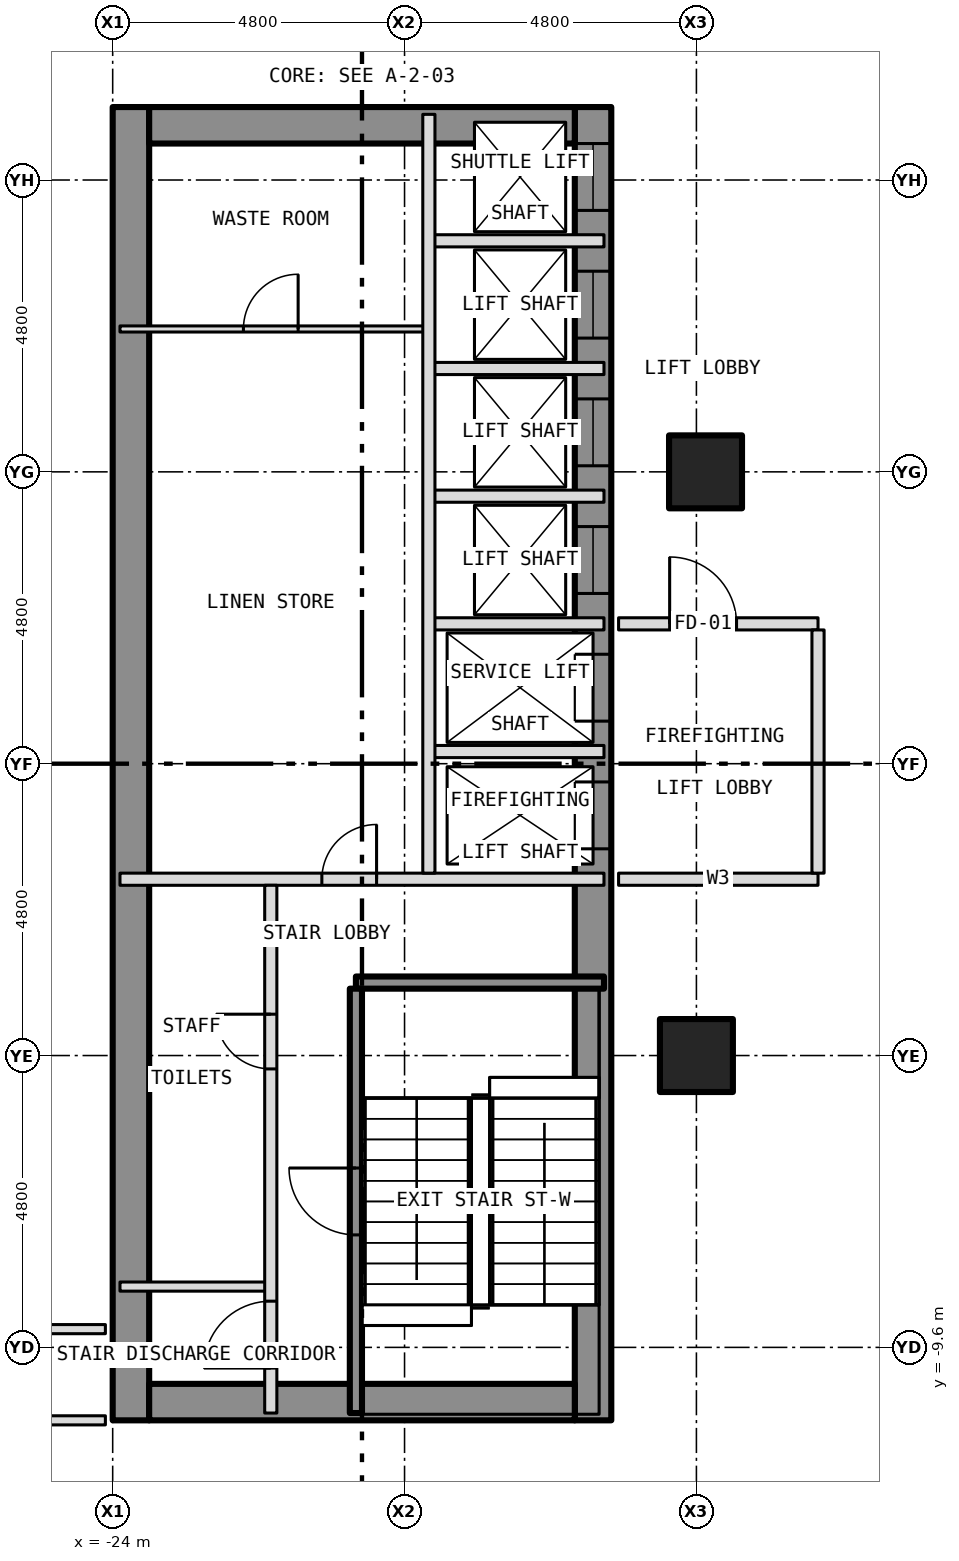
"""IFC4 building model, lengths in metres.
Left out: names, types, materials, properties, quantities, classifications, styles, units other than length and angle.
Written with IfcOpenShell. Run it as: python <this file> out.ifc"""

import sys

from ifc_helpers import new_model, si_unit, direction, frame, frame_2d, origin, origin_2d, place, context, subcontext, project, spatial, rectangle, hollow_rectangle, extrude, element, fill, save


model = new_model("IFC4")
c1 = context("Model", 3, precision=1e-05, world=origin(), true_north=direction((0.0, 1.0)))
c2 = subcontext(c1, "Body", "Model", "MODEL_VIEW")
j1 = project(units=[si_unit("LENGTHUNIT", "METRE"), si_unit("PLANEANGLEUNIT", "RADIAN")], contexts=[c1])
p1 = place(None, origin())
s1 = spatial("IfcSite", under=j1, at=p1, CompositionType="ELEMENT")
p2 = place(p1, origin())
s2 = spatial("IfcBuilding", under=s1, at=p2, CompositionType="ELEMENT")
p3 = place(p2, origin())
s3 = spatial("IfcBuildingStorey", under=s2, at=p3, CompositionType="ELEMENT", Elevation=0.0)
for number, where, z_axis, x_axis in (
    (1, (-14.4, -4.8, -0.3), (0.0, 0.0, 1.0), (1.0, 0.0, 0.0)),
    (2, (-14.25, 4.8, -0.3), (0.0, 0.0, 1.0), (1.0, 0.0, 0.0)),
):
    element("IfcColumn", number, at=place(p3, frame(where, z_axis=z_axis, x_axis=x_axis)), inside=s3, PredefinedType="COLUMN", context=c2, shape_type="SweptSolid", body=[
        extrude(hollow_rectangle(XDim=1.2, YDim=1.2, WallThickness=0.07, at=origin_2d()), origin(), (0.0, 0.0, 1.0), 7.55),
    ])
p4 = place(p3, frame((-16.1, -10.8, 0.0), z_axis=(0.0, 0.0, 1.0), x_axis=(0.0, 1.0, 0.0)))
e3 = element("IfcWall", 3, at=p4, inside=s3, PredefinedType="SHEAR", context=c2, shape_type="SweptSolid", body=[
    extrude(rectangle(XDim=21.6, YDim=0.6, at=frame_2d((10.8, 0.0))), origin(), (0.0, 0.0, 1.0), 7.2),
])
p5 = place(p4, frame((9.4, 0.0, 0.0)))
e4 = element("IfcOpeningElement", 4, at=p5, cuts=e3, PredefinedType="OPENING", context=c2, shape_type="SweptSolid", body=[
    extrude(rectangle(XDim=1.1, YDim=2.1, at=frame_2d((0.55, 1.05))), frame((0.0, 0.312, 0.0), z_axis=(0.0, -1.0, 0.0), x_axis=(1.0, 0.0, 0.0)), (0.0, 0.0, 1.0), 0.624),
])
p6 = place(p4, frame((11.5, 0.0, 0.0)))
e5 = element("IfcOpeningElement", 5, at=p6, cuts=e3, PredefinedType="OPENING", context=c2, shape_type="SweptSolid", body=[
    extrude(rectangle(XDim=1.1, YDim=2.1, at=frame_2d((0.55, 1.05))), frame((0.0, 0.312, 0.0), z_axis=(0.0, -1.0, 0.0), x_axis=(1.0, 0.0, 0.0)), (0.0, 0.0, 1.0), 0.624),
])
p7 = place(p4, frame((13.6, 0.0, 0.0)))
e6 = element("IfcOpeningElement", 6, at=p7, cuts=e3, PredefinedType="OPENING", context=c2, shape_type="SweptSolid", body=[
    extrude(rectangle(XDim=1.1, YDim=2.1, at=frame_2d((0.55, 1.05))), frame((0.0, 0.312, 0.0), z_axis=(0.0, -1.0, 0.0), x_axis=(1.0, 0.0, 0.0)), (0.0, 0.0, 1.0), 0.624),
])
p8 = place(p4, frame((15.7, 0.0, 0.0)))
e7 = element("IfcOpeningElement", 7, at=p8, cuts=e3, PredefinedType="OPENING", context=c2, shape_type="SweptSolid", body=[
    extrude(rectangle(XDim=1.1, YDim=2.1, at=frame_2d((0.55, 1.05))), frame((0.0, 0.312, 0.0), z_axis=(0.0, -1.0, 0.0), x_axis=(1.0, 0.0, 0.0)), (0.0, 0.0, 1.0), 0.624),
])
p9 = place(p4, frame((17.8, 0.0, 0.0)))
e8 = element("IfcOpeningElement", 8, at=p9, cuts=e3, PredefinedType="OPENING", context=c2, shape_type="SweptSolid", body=[
    extrude(rectangle(XDim=1.1, YDim=2.1, at=frame_2d((0.55, 1.05))), frame((0.0, 0.312, 0.0), z_axis=(0.0, -1.0, 0.0), x_axis=(1.0, 0.0, 0.0)), (0.0, 0.0, 1.0), 0.624),
])
p10 = place(p4, frame((19.9, 0.0, 0.0)))
e9 = element("IfcOpeningElement", 9, at=p10, cuts=e3, PredefinedType="OPENING", context=c2, shape_type="SweptSolid", body=[
    extrude(rectangle(XDim=1.1, YDim=2.1, at=frame_2d((0.55, 1.05))), frame((0.0, 0.312, 0.0), z_axis=(0.0, -1.0, 0.0), x_axis=(1.0, 0.0, 0.0)), (0.0, 0.0, 1.0), 0.624),
])
p11 = place(p3, frame((-23.7, -10.8, 0.0), z_axis=(0.0, 0.0, 1.0), x_axis=(0.0, 1.0, 0.0)))
e10 = element("IfcWall", 10, at=p11, inside=s3, PredefinedType="SHEAR", context=c2, shape_type="SweptSolid", body=[
    extrude(rectangle(XDim=21.6, YDim=0.6, at=frame_2d((10.8, 0.0))), origin(), (0.0, 0.0, 1.0), 7.2),
])
for number, where, z_axis, x_axis in (
    (11, (-23.4, 10.5, 0.0), (0.0, 0.0, 1.0), (1.0, 0.0, 0.0)),
    (12, (-23.4, -10.5, 0.0), (0.0, 0.0, 1.0), (1.0, 0.0, 0.0)),
):
    element("IfcWall", number, at=place(p3, frame(where, z_axis=z_axis, x_axis=x_axis)), inside=s3, PredefinedType="SHEAR", context=c2, shape_type="SweptSolid", body=[
        extrude(rectangle(XDim=7.0, YDim=0.6, at=frame_2d((3.5, 0.0))), origin(), (0.0, 0.0, 1.0), 7.2),
    ])
for number, where, z_axis, x_axis in (
    (13, (-36.9, -10.8, 0.0), (0.0, 0.0, 1.0), (1.0, 0.0, 0.0)),
    (14, (-36.9, -9.3, 0.0), (0.0, 0.0, 1.0), (1.0, 0.0, 0.0)),
):
    element("IfcWall", number, at=place(p3, frame(where, z_axis=z_axis, x_axis=x_axis)), inside=s3, PredefinedType="PARTITIONING", context=c2, shape_type="SweptSolid", body=[
        extrude(rectangle(XDim=12.78, YDim=0.15, at=frame_2d((6.39, 0.0))), origin(), (0.0, 0.0, 1.0), 7.25),
    ])
p12 = place(p3, frame((-23.88, -8.6, 0.0), z_axis=(0.0, 0.0, 1.0), x_axis=(1.0, 0.0, 0.0)))
e15 = element("IfcWall", 15, at=p12, inside=s3, PredefinedType="PARTITIONING", context=c2, shape_type="SweptSolid", body=[
    extrude(rectangle(XDim=2.48, YDim=0.15, at=frame_2d((1.24, 0.0))), origin(), (0.0, 0.0, 1.0), 7.2),
])
p13 = place(p3, frame((-20.0, -3.6, 0.0), z_axis=(0.0, 0.0, 1.0), x_axis=(1.0, 0.0, 0.0)))
e16 = element("IfcWall", 16, at=p13, inside=s3, PredefinedType="SHEAR", context=c2, shape_type="SweptSolid", body=[
    extrude(rectangle(XDim=4.08, YDim=0.2, at=frame_2d((2.04, 0.0))), origin(), (0.0, 0.0, 1.0), 7.2),
])
p14 = place(p3, frame((-23.88, -1.9, 0.0), z_axis=(0.0, 0.0, 1.0), x_axis=(1.0, 0.0, 0.0)))
e17 = element("IfcWall", 17, at=p14, inside=s3, PredefinedType="PARTITIONING", context=c2, shape_type="SweptSolid", body=[
    extrude(rectangle(XDim=7.96, YDim=0.2, at=frame_2d((3.98, 0.0))), origin(), (0.0, 0.0, 1.0), 7.2),
])
p15 = place(p14, frame((3.32, 0.0, 0.0)))
e18 = element("IfcOpeningElement", 18, at=p15, cuts=e17, PredefinedType="OPENING", context=c2, shape_type="SweptSolid", body=[
    extrude(rectangle(XDim=0.9, YDim=2.1, at=frame_2d((0.45, 1.05))), frame((0.0, 0.112, 0.0), z_axis=(0.0, -1.0, 0.0), x_axis=(1.0, 0.0, 0.0)), (0.0, 0.0, 1.0), 0.224),
])
p16 = place(p3, frame((-15.68, -1.9, 0.0), z_axis=(0.0, 0.0, 1.0), x_axis=(1.0, 0.0, 0.0)))
e19 = element("IfcWall", 19, at=p16, inside=s3, PredefinedType="PARTITIONING", context=c2, shape_type="SweptSolid", body=[
    extrude(rectangle(XDim=3.28, YDim=0.2, at=frame_2d((1.64, 0.0))), origin(), (0.0, 0.0, 1.0), 7.25),
])
for number, where, z_axis, x_axis in (
    (20, (-18.8, 0.2, 0.0), (0.0, 0.0, 1.0), (1.0, 0.0, 0.0)),
    (21, (-18.8, 2.3, 0.0), (0.0, 0.0, 1.0), (1.0, 0.0, 0.0)),
):
    element("IfcWall", number, at=place(p3, frame(where, z_axis=z_axis, x_axis=x_axis)), inside=s3, PredefinedType="PARTITIONING", context=c2, shape_type="SweptSolid", body=[
        extrude(rectangle(XDim=2.88, YDim=0.2, at=frame_2d((1.44, 0.0))), origin(), (0.0, 0.0, 1.0), 7.2),
    ])
p17 = place(p3, frame((-15.68, 2.3, 0.0), z_axis=(0.0, 0.0, 1.0), x_axis=(1.0, 0.0, 0.0)))
e22 = element("IfcWall", 22, at=p17, inside=s3, PredefinedType="PARTITIONING", context=c2, shape_type="SweptSolid", body=[
    extrude(rectangle(XDim=3.28, YDim=0.2, at=frame_2d((1.64, 0.0))), origin(), (0.0, 0.0, 1.0), 7.25),
])
p18 = place(p17, frame((0.84, 0.0, 0.0)))
e23 = element("IfcOpeningElement", 23, at=p18, cuts=e22, PredefinedType="OPENING", context=c2, shape_type="SweptSolid", body=[
    extrude(rectangle(XDim=1.1, YDim=2.1, at=frame_2d((0.55, 1.05))), frame((0.0, 0.112, 0.0), z_axis=(0.0, -1.0, 0.0), x_axis=(1.0, 0.0, 0.0)), (0.0, 0.0, 1.0), 0.224),
])
for number, where, z_axis, x_axis in (
    (24, (-18.8, 4.4, 0.0), (0.0, 0.0, 1.0), (1.0, 0.0, 0.0)),
    (25, (-18.8, 6.5, 0.0), (0.0, 0.0, 1.0), (1.0, 0.0, 0.0)),
):
    element("IfcWall", number, at=place(p3, frame(where, z_axis=z_axis, x_axis=x_axis)), inside=s3, PredefinedType="PARTITIONING", context=c2, shape_type="SweptSolid", body=[
        extrude(rectangle(XDim=2.88, YDim=0.2, at=frame_2d((1.44, 0.0))), origin(), (0.0, 0.0, 1.0), 7.2),
    ])
p19 = place(p3, frame((-23.88, 7.15, 0.0), z_axis=(0.0, 0.0, 1.0), x_axis=(1.0, 0.0, 0.0)))
e26 = element("IfcWall", 26, at=p19, inside=s3, PredefinedType="PARTITIONING", context=c2, shape_type="SweptSolid", body=[
    extrude(rectangle(XDim=5.08, YDim=0.1, at=frame_2d((2.54, 0.0))), origin(), (0.0, 0.0, 1.0), 7.2),
])
p20 = place(p19, frame((2.03, 0.0, 0.0)))
e27 = element("IfcOpeningElement", 27, at=p20, cuts=e26, PredefinedType="OPENING", context=c2, shape_type="SweptSolid", body=[
    extrude(rectangle(XDim=0.9, YDim=2.1, at=frame_2d((0.45, 1.05))), frame((0.0, 0.062, 0.0), z_axis=(0.0, -1.0, 0.0), x_axis=(1.0, 0.0, 0.0)), (0.0, 0.0, 1.0), 0.124),
])
p21 = place(p3, frame((-18.8, 8.6, 0.0), z_axis=(0.0, 0.0, 1.0), x_axis=(1.0, 0.0, 0.0)))
e28 = element("IfcWall", 28, at=p21, inside=s3, PredefinedType="PARTITIONING", context=c2, shape_type="SweptSolid", body=[
    extrude(rectangle(XDim=2.88, YDim=0.2, at=frame_2d((1.44, 0.0))), origin(), (0.0, 0.0, 1.0), 7.2),
])
p22 = place(p3, frame((-21.4, -10.68, 0.0), z_axis=(0.0, 0.0, 1.0), x_axis=(0.0, 1.0, 0.0)))
e29 = element("IfcWall", 29, at=p22, inside=s3, PredefinedType="PARTITIONING", context=c2, shape_type="SweptSolid", body=[
    extrude(rectangle(XDim=8.68, YDim=0.2, at=frame_2d((4.34, 0.0))), origin(), (0.0, 0.0, 1.0), 7.2),
])
p23 = place(p22, frame((5.66, 0.0, 0.0)))
e30 = element("IfcOpeningElement", 30, at=p23, cuts=e29, PredefinedType="OPENING", context=c2, shape_type="SweptSolid", body=[
    extrude(rectangle(XDim=0.9, YDim=2.1, at=frame_2d((0.45, 1.05))), frame((0.0, 0.112, 0.0), z_axis=(0.0, -1.0, 0.0), x_axis=(1.0, 0.0, 0.0)), (0.0, 0.0, 1.0), 0.224),
])
p24 = place(p22, frame((0.74, 0.0, 0.0)))
e31 = element("IfcOpeningElement", 31, at=p24, cuts=e29, PredefinedType="OPENING", context=c2, shape_type="SweptSolid", body=[
    extrude(rectangle(XDim=1.1, YDim=2.1, at=frame_2d((0.55, 1.05))), frame((0.0, 0.112, 0.0), z_axis=(0.0, -1.0, 0.0), x_axis=(1.0, 0.0, 0.0)), (0.0, 0.0, 1.0), 0.224),
])
p25 = place(p3, frame((-20.0, -10.68, 0.0), z_axis=(0.0, 0.0, 1.0), x_axis=(0.0, 1.0, 0.0)))
e32 = element("IfcWall", 32, at=p25, inside=s3, PredefinedType="SHEAR", context=c2, shape_type="SweptSolid", body=[
    extrude(rectangle(XDim=6.98, YDim=0.2, at=frame_2d((3.49, 0.0))), origin(), (0.0, 0.0, 1.0), 7.2),
])
p26 = place(p25, frame((2.93, 0.0, 0.0)))
e33 = element("IfcOpeningElement", 33, at=p26, cuts=e32, PredefinedType="OPENING", context=c2, shape_type="SweptSolid", body=[
    extrude(rectangle(XDim=1.1, YDim=2.1, at=frame_2d((0.55, 1.05))), frame((0.0, 0.112, 0.0), z_axis=(0.0, -1.0, 0.0), x_axis=(1.0, 0.0, 0.0)), (0.0, 0.0, 1.0), 0.224),
])
p27 = place(p3, frame((-18.8, -1.8, 0.0), z_axis=(0.0, 0.0, 1.0), x_axis=(0.0, 1.0, 0.0)))
e34 = element("IfcWall", 34, at=p27, inside=s3, PredefinedType="PARTITIONING", context=c2, shape_type="SweptSolid", body=[
    extrude(rectangle(XDim=12.48, YDim=0.2, at=frame_2d((6.24, 0.0))), origin(), (0.0, 0.0, 1.0), 7.2),
])
p28 = place(p3, frame((-12.4, -1.8, 0.0), z_axis=(0.0, 0.0, 1.0), x_axis=(0.0, 1.0, 0.0)))
e35 = element("IfcWall", 35, at=p28, inside=s3, PredefinedType="PARTITIONING", context=c2, shape_type="SweptSolid", body=[
    extrude(rectangle(XDim=4.0, YDim=0.2, at=frame_2d((2.0, 0.0))), origin(), (0.0, 0.0, 1.0), 7.25),
])
p29 = place(p5, origin())
e36 = element("IfcDoor", 36, at=p29, inside=s3, OperationType="SLIDING_TO_LEFT", PredefinedType="DOOR", context=c2, shape_type="SweptSolid", body=[
    extrude(rectangle(XDim=1.1, YDim=2.1, at=frame_2d((0.55, 1.05))), frame((0.0, 0.025, 0.0), z_axis=(0.0, -1.0, 0.0), x_axis=(1.0, 0.0, 0.0)), (0.0, 0.0, 1.0), 0.05),
])
fill(e4, e36)
p30 = place(p6, origin())
e37 = element("IfcDoor", 37, at=p30, inside=s3, OperationType="SLIDING_TO_LEFT", PredefinedType="DOOR", context=c2, shape_type="SweptSolid", body=[
    extrude(rectangle(XDim=1.1, YDim=2.1, at=frame_2d((0.55, 1.05))), frame((0.0, 0.025, 0.0), z_axis=(0.0, -1.0, 0.0), x_axis=(1.0, 0.0, 0.0)), (0.0, 0.0, 1.0), 0.05),
])
fill(e5, e37)
p31 = place(p7, origin())
e38 = element("IfcDoor", 38, at=p31, inside=s3, OperationType="SLIDING_TO_LEFT", PredefinedType="DOOR", context=c2, shape_type="SweptSolid", body=[
    extrude(rectangle(XDim=1.1, YDim=2.1, at=frame_2d((0.55, 1.05))), frame((0.0, 0.025, 0.0), z_axis=(0.0, -1.0, 0.0), x_axis=(1.0, 0.0, 0.0)), (0.0, 0.0, 1.0), 0.05),
])
fill(e6, e38)
p32 = place(p8, origin())
e39 = element("IfcDoor", 39, at=p32, inside=s3, OperationType="SLIDING_TO_LEFT", PredefinedType="DOOR", context=c2, shape_type="SweptSolid", body=[
    extrude(rectangle(XDim=1.1, YDim=2.1, at=frame_2d((0.55, 1.05))), frame((0.0, 0.025, 0.0), z_axis=(0.0, -1.0, 0.0), x_axis=(1.0, 0.0, 0.0)), (0.0, 0.0, 1.0), 0.05),
])
fill(e7, e39)
p33 = place(p9, origin())
e40 = element("IfcDoor", 40, at=p33, inside=s3, OperationType="SLIDING_TO_LEFT", PredefinedType="DOOR", context=c2, shape_type="SweptSolid", body=[
    extrude(rectangle(XDim=1.1, YDim=2.1, at=frame_2d((0.55, 1.05))), frame((0.0, 0.025, 0.0), z_axis=(0.0, -1.0, 0.0), x_axis=(1.0, 0.0, 0.0)), (0.0, 0.0, 1.0), 0.05),
])
fill(e8, e40)
p34 = place(p10, origin())
e41 = element("IfcDoor", 41, at=p34, inside=s3, OperationType="SLIDING_TO_LEFT", PredefinedType="DOOR", context=c2, shape_type="SweptSolid", body=[
    extrude(rectangle(XDim=1.1, YDim=2.1, at=frame_2d((0.55, 1.05))), frame((0.0, 0.025, 0.0), z_axis=(0.0, -1.0, 0.0), x_axis=(1.0, 0.0, 0.0)), (0.0, 0.0, 1.0), 0.05),
])
fill(e9, e41)
p35 = place(p23, origin())
e42 = element("IfcDoor", 42, at=p35, inside=s3, OperationType="SINGLE_SWING_RIGHT", PredefinedType="DOOR", context=c2, shape_type="SweptSolid", body=[
    extrude(rectangle(XDim=0.9, YDim=2.1, at=frame_2d((0.45, 1.05))), frame((0.0, 0.025, 0.0), z_axis=(0.0, -1.0, 0.0), x_axis=(1.0, 0.0, 0.0)), (0.0, 0.0, 1.0), 0.05),
])
fill(e30, e42)
p36 = place(p15, origin())
e43 = element("IfcDoor", 43, at=p36, inside=s3, OperationType="SINGLE_SWING_RIGHT", PredefinedType="DOOR", context=c2, shape_type="SweptSolid", body=[
    extrude(rectangle(XDim=0.9, YDim=2.1, at=frame_2d((0.45, 1.05))), frame((0.0, 0.025, 0.0), z_axis=(0.0, -1.0, 0.0), x_axis=(1.0, 0.0, 0.0)), (0.0, 0.0, 1.0), 0.05),
])
fill(e18, e43)
p37 = place(p20, origin())
e44 = element("IfcDoor", 44, at=p37, inside=s3, OperationType="SINGLE_SWING_RIGHT", PredefinedType="DOOR", context=c2, shape_type="SweptSolid", body=[
    extrude(rectangle(XDim=0.9, YDim=2.1, at=frame_2d((0.45, 1.05))), frame((0.0, 0.025, 0.0), z_axis=(0.0, -1.0, 0.0), x_axis=(1.0, 0.0, 0.0)), (0.0, 0.0, 1.0), 0.05),
])
fill(e27, e44)
p38 = place(p18, origin())
e45 = element("IfcDoor", 45, at=p38, inside=s3, OperationType="SINGLE_SWING_LEFT", PredefinedType="DOOR", context=c2, shape_type="SweptSolid", body=[
    extrude(rectangle(XDim=1.1, YDim=2.1, at=frame_2d((0.55, 1.05))), frame((0.0, 0.025, 0.0), z_axis=(0.0, -1.0, 0.0), x_axis=(1.0, 0.0, 0.0)), (0.0, 0.0, 1.0), 0.05),
])
fill(e23, e45)
p39 = place(p24, origin())
e46 = element("IfcDoor", 46, at=p39, inside=s3, OperationType="SINGLE_SWING_LEFT", PredefinedType="DOOR", context=c2, shape_type="SweptSolid", body=[
    extrude(rectangle(XDim=1.1, YDim=2.1, at=frame_2d((0.55, 1.05))), frame((0.0, 0.025, 0.0), z_axis=(0.0, -1.0, 0.0), x_axis=(1.0, 0.0, 0.0)), (0.0, 0.0, 1.0), 0.05),
])
fill(e31, e46)
p40 = place(p26, origin())
e47 = element("IfcDoor", 47, at=p40, inside=s3, OperationType="SINGLE_SWING_RIGHT", PredefinedType="DOOR", context=c2, shape_type="SweptSolid", body=[
    extrude(rectangle(XDim=1.1, YDim=2.1, at=frame_2d((0.55, 1.05))), frame((0.0, 0.025, 0.0), z_axis=(0.0, -1.0, 0.0), x_axis=(1.0, 0.0, 0.0)), (0.0, 0.0, 1.0), 0.05),
])
fill(e33, e47)
save(model, sys.argv[1])
